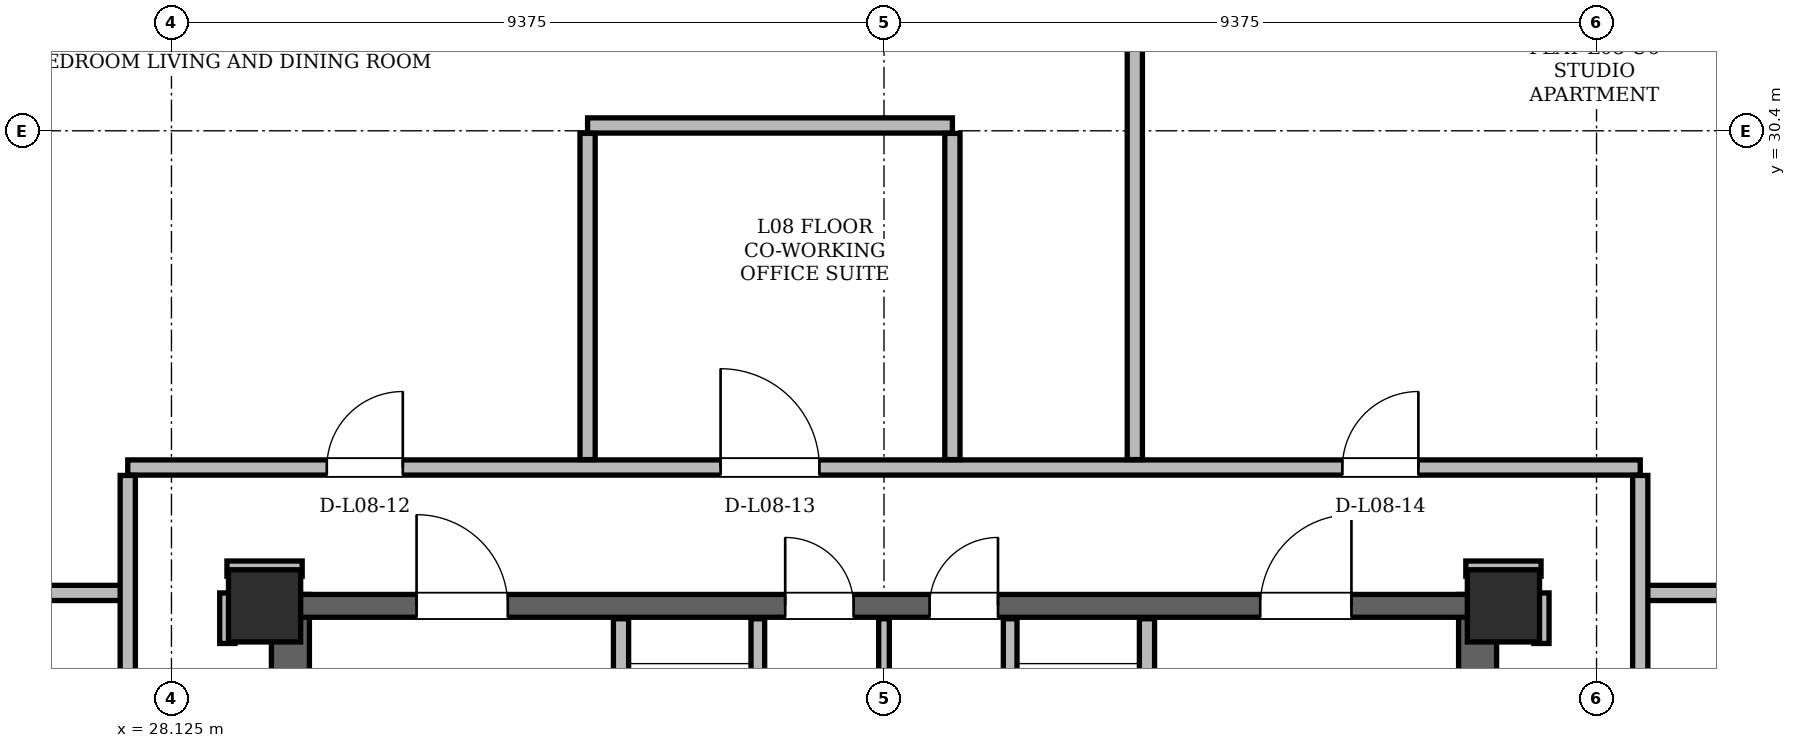
"""IFC4 building model, lengths in metres.
Left out: names, types, materials, properties, quantities, classifications, styles, units other than length and angle.
Written with IfcOpenShell. Run it as: python <this file> out.ifc"""

import sys

from ifc_helpers import new_model, si_unit, direction, frame, frame_2d, origin, origin_2d, place, context, subcontext, project, spatial, rectangle, hollow_rectangle, extrude, element, fill, save


model = new_model("IFC4")
c1 = context("Model", 3, precision=1e-05, world=origin(), true_north=direction((0.0, 1.0)))
c2 = subcontext(c1, "Body", "Model", "MODEL_VIEW")
j1 = project(units=[si_unit("LENGTHUNIT", "METRE"), si_unit("PLANEANGLEUNIT", "RADIAN")], contexts=[c1])
p1 = place(None, origin())
s1 = spatial("IfcSite", under=j1, at=p1, CompositionType="ELEMENT")
p2 = place(p1, origin())
s2 = spatial("IfcBuilding", under=s1, at=p2, CompositionType="ELEMENT")
p3 = place(p2, frame((0.0, 0.0, 34.5)))
s3 = spatial("IfcBuildingStorey", under=s2, at=p3, CompositionType="ELEMENT", Elevation=34.5)
for number, where, z_axis, x_axis in (
    (1, (45.65, 24.15, 0.0), (0.0, 0.0, 1.0), (1.0, 0.0, 0.0)),
    (2, (29.35, 24.15, 0.0), (0.0, 0.0, 1.0), (1.0, 0.0, 0.0)),
):
    element("IfcColumn", number, at=place(p3, frame(where, z_axis=z_axis, x_axis=x_axis)), inside=s3, PredefinedType="COLUMN", context=c2, shape_type="SweptSolid", body=[
        extrude(hollow_rectangle(XDim=0.95, YDim=0.95, WallThickness=0.08, at=origin_2d()), origin(), (0.0, 0.0, 1.0), 3.6),
    ])
for number, where, z_axis, x_axis in (
    (3, (29.69, 11.0, 0.0), (0.0, 0.0, 1.0), (0.0, 1.0, 0.0)),
    (4, (45.31, 11.0, 0.0), (0.0, 0.0, 1.0), (0.0, 1.0, 0.0)),
):
    element("IfcWall", number, at=place(p3, frame(where, z_axis=z_axis, x_axis=x_axis)), inside=s3, PredefinedType="SHEAR", context=c2, shape_type="SweptSolid", body=[
        extrude(rectangle(XDim=13.3, YDim=0.5, at=frame_2d((6.65, 0.0))), origin(), (0.0, 0.0, 1.0), 3.36),
    ])
p4 = place(p3, frame((29.65, 24.15, 0.0), z_axis=(0.0, 0.0, 1.0), x_axis=(1.0, 0.0, 0.0)))
e5 = element("IfcWall", 5, at=p4, inside=s3, PredefinedType="SHEAR", context=c2, shape_type="SweptSolid", body=[
    extrude(rectangle(XDim=15.7, YDim=0.3, at=frame_2d((7.85, 0.0))), origin(), (0.0, 0.0, 1.0), 3.36),
])
p5 = place(p4, frame((1.7, 0.0, 0.0)))
e6 = element("IfcOpeningElement", 6, at=p5, cuts=e5, PredefinedType="OPENING", context=c2, shape_type="SweptSolid", body=[
    extrude(rectangle(XDim=1.2, YDim=2.2, at=frame_2d((0.6, 1.1))), frame((0.0, 0.15, 0.0), z_axis=(0.0, -1.0, 0.0), x_axis=(1.0, 0.0, 0.0)), (0.0, 0.0, 1.0), 0.3),
])
p6 = place(p4, frame((12.8, 0.0, 0.0)))
e7 = element("IfcOpeningElement", 7, at=p6, cuts=e5, PredefinedType="OPENING", context=c2, shape_type="SweptSolid", body=[
    extrude(rectangle(XDim=1.2, YDim=2.2, at=frame_2d((0.6, 1.1))), frame((0.0, 0.15, 0.0), z_axis=(0.0, -1.0, 0.0), x_axis=(1.0, 0.0, 0.0)), (0.0, 0.0, 1.0), 0.3),
])
p7 = place(p4, frame((6.55, 0.0, 0.0)))
e8 = element("IfcOpeningElement", 8, at=p7, cuts=e5, PredefinedType="OPENING", context=c2, shape_type="SweptSolid", body=[
    extrude(rectangle(XDim=0.9, YDim=2.05, at=frame_2d((0.45, 1.025))), frame((0.0, 0.15, 0.0), z_axis=(0.0, -1.0, 0.0), x_axis=(1.0, 0.0, 0.0)), (0.0, 0.0, 1.0), 0.3),
])
p8 = place(p4, frame((8.45, 0.0, 0.0)))
e9 = element("IfcOpeningElement", 9, at=p8, cuts=e5, PredefinedType="OPENING", context=c2, shape_type="SweptSolid", body=[
    extrude(rectangle(XDim=0.9, YDim=2.05, at=frame_2d((0.45, 1.025))), frame((0.0, 0.15, 0.0), z_axis=(0.0, -1.0, 0.0), x_axis=(1.0, 0.0, 0.0)), (0.0, 0.0, 1.0), 0.3),
])
p9 = place(p3, frame((61.778, 15.108, 0.0), z_axis=(0.0, 0.0, 1.0), x_axis=(-0.499999106891, 0.866025919421, 0.0)))
e10 = element("IfcWall", 10, at=p9, inside=s3, PredefinedType="SOLIDWALL", context=c2, shape_type="SweptSolid", body=[
    extrude(rectangle(XDim=32.924, YDim=0.34, at=frame_2d((16.462, 0.0))), origin(), (0.0, 0.0, 1.0), 2.494),
])
p10 = place(p9, frame((6.159, 0.0, 0.0)))
e11 = element("IfcOpeningElement", 11, at=p10, cuts=e10, PredefinedType="OPENING", context=c2, shape_type="SweptSolid", body=[
    extrude(rectangle(XDim=1.5, YDim=2.2, at=frame_2d((0.75, 1.1))), frame((0.0, 0.17, 0.0), z_axis=(0.0, -1.0, 0.0), x_axis=(1.0, 0.0, 0.0)), (0.0, 0.0, 1.0), 0.34),
])
p11 = place(p9, frame((25.069, 0.0, 0.0)))
e12 = element("IfcOpeningElement", 12, at=p11, cuts=e10, PredefinedType="OPENING", context=c2, shape_type="SweptSolid", body=[
    extrude(rectangle(XDim=1.5, YDim=2.2, at=frame_2d((0.75, 1.1))), frame((0.0, 0.17, 0.0), z_axis=(0.0, -1.0, 0.0), x_axis=(1.0, 0.0, 0.0)), (0.0, 0.0, 1.0), 0.34),
])
p12 = place(p9, frame((2.207, 0.0, 0.85)))
e13 = element("IfcOpeningElement", 13, at=p12, cuts=e10, PredefinedType="OPENING", context=c2, shape_type="SweptSolid", body=[
    extrude(rectangle(XDim=2.2, YDim=1.534, at=frame_2d((1.1, 0.767))), frame((0.0, 0.17, 0.0), z_axis=(0.0, -1.0, 0.0), x_axis=(1.0, 0.0, 0.0)), (0.0, 0.0, 1.0), 0.34),
])
p13 = place(p9, frame((12.558, 0.0, 0.85)))
e14 = element("IfcOpeningElement", 14, at=p13, cuts=e10, PredefinedType="OPENING", context=c2, shape_type="SweptSolid", body=[
    extrude(rectangle(XDim=2.0, YDim=1.534, at=frame_2d((1.0, 0.767))), frame((0.0, 0.17, 0.0), z_axis=(0.0, -1.0, 0.0), x_axis=(1.0, 0.0, 0.0)), (0.0, 0.0, 1.0), 0.34),
])
p14 = place(p9, frame((19.845, 0.0, 0.85)))
e15 = element("IfcOpeningElement", 15, at=p14, cuts=e10, PredefinedType="OPENING", context=c2, shape_type="SweptSolid", body=[
    extrude(rectangle(XDim=1.4, YDim=1.534, at=frame_2d((0.7, 0.767))), frame((0.0, 0.17, 0.0), z_axis=(0.0, -1.0, 0.0), x_axis=(1.0, 0.0, 0.0)), (0.0, 0.0, 1.0), 0.34),
])
p15 = place(p9, frame((30.606, 0.0, 0.85)))
e16 = element("IfcOpeningElement", 16, at=p15, cuts=e10, PredefinedType="OPENING", context=c2, shape_type="SweptSolid", body=[
    extrude(rectangle(XDim=1.2, YDim=1.48, at=frame_2d((0.6, 0.74))), frame((0.0, 0.17, 0.0), z_axis=(0.0, -1.0, 0.0), x_axis=(1.0, 0.0, 0.0)), (0.0, 0.0, 1.0), 0.34),
])
p16 = place(p3, frame((29.684, 43.621, 0.0), z_axis=(0.0, 0.0, 1.0), x_axis=(-0.499999106891, -0.866025919421, 0.0)))
e17 = element("IfcWall", 17, at=p16, inside=s3, PredefinedType="SOLIDWALL", context=c2, shape_type="SweptSolid", body=[
    extrude(rectangle(XDim=32.924, YDim=0.34, at=frame_2d((16.462, 0.0))), origin(), (0.0, 0.0, 1.0), 2.494),
])
p17 = place(p16, frame((6.159, 0.0, 0.0)))
e18 = element("IfcOpeningElement", 18, at=p17, cuts=e17, PredefinedType="OPENING", context=c2, shape_type="SweptSolid", body=[
    extrude(rectangle(XDim=1.5, YDim=2.2, at=frame_2d((0.75, 1.1))), frame((0.0, 0.17, 0.0), z_axis=(0.0, -1.0, 0.0), x_axis=(1.0, 0.0, 0.0)), (0.0, 0.0, 1.0), 0.34),
])
p18 = place(p16, frame((24.019, 0.0, 0.0)))
e19 = element("IfcOpeningElement", 19, at=p18, cuts=e17, PredefinedType="OPENING", context=c2, shape_type="SweptSolid", body=[
    extrude(rectangle(XDim=1.5, YDim=2.2, at=frame_2d((0.75, 1.1))), frame((0.0, 0.17, 0.0), z_axis=(0.0, -1.0, 0.0), x_axis=(1.0, 0.0, 0.0)), (0.0, 0.0, 1.0), 0.34),
])
p19 = place(p16, frame((29.245, 0.0, 0.85)))
e20 = element("IfcOpeningElement", 20, at=p19, cuts=e17, PredefinedType="OPENING", context=c2, shape_type="SweptSolid", body=[
    extrude(rectangle(XDim=2.4, YDim=1.534, at=frame_2d((1.2, 0.767))), frame((0.0, 0.17, 0.0), z_axis=(0.0, -1.0, 0.0), x_axis=(1.0, 0.0, 0.0)), (0.0, 0.0, 1.0), 0.34),
])
p20 = place(p16, frame((10.753, 0.0, 0.85)))
e21 = element("IfcOpeningElement", 21, at=p20, cuts=e17, PredefinedType="OPENING", context=c2, shape_type="SweptSolid", body=[
    extrude(rectangle(XDim=2.5, YDim=1.534, at=frame_2d((1.25, 0.767))), frame((0.0, 0.17, 0.0), z_axis=(0.0, -1.0, 0.0), x_axis=(1.0, 0.0, 0.0)), (0.0, 0.0, 1.0), 0.34),
])
p21 = place(p16, frame((17.723, 0.0, 0.85)))
e22 = element("IfcOpeningElement", 22, at=p21, cuts=e17, PredefinedType="OPENING", context=c2, shape_type="SweptSolid", body=[
    extrude(rectangle(XDim=2.4, YDim=1.534, at=frame_2d((1.2, 0.767))), frame((0.0, 0.17, 0.0), z_axis=(0.0, -1.0, 0.0), x_axis=(1.0, 0.0, 0.0)), (0.0, 0.0, 1.0), 0.34),
])
p22 = place(p16, frame((1.538, 0.0, 0.85)))
e23 = element("IfcOpeningElement", 23, at=p22, cuts=e17, PredefinedType="OPENING", context=c2, shape_type="SweptSolid", body=[
    extrude(rectangle(XDim=1.2, YDim=1.48, at=frame_2d((0.6, 0.74))), frame((0.0, 0.17, 0.0), z_axis=(0.0, -1.0, 0.0), x_axis=(1.0, 0.0, 0.0)), (0.0, 0.0, 1.0), 0.34),
])
p23 = place(p16, frame((0.69, 0.0, 0.85)))
e24 = element("IfcOpeningElement", 24, at=p23, cuts=e17, PredefinedType="OPENING", context=c2, shape_type="SweptSolid", body=[
    extrude(rectangle(XDim=0.7, YDim=1.2, at=frame_2d((0.35, 0.6))), frame((0.0, 0.17, 0.0), z_axis=(0.0, -1.0, 0.0), x_axis=(1.0, 0.0, 0.0)), (0.0, 0.0, 1.0), 0.34),
])
p24 = place(p3, frame((34.04, 19.48, 0.0), z_axis=(0.0, 0.0, 1.0), x_axis=(0.0, 1.0, 0.0)))
e25 = element("IfcWall", 25, at=p24, inside=s3, PredefinedType="PARTITIONING", context=c2, shape_type="SweptSolid", body=[
    extrude(rectangle(XDim=4.5, YDim=0.2, at=frame_2d((2.25, 0.0))), origin(), (0.0, 0.0, 1.0), 2.4),
])
p25 = place(p24, frame((2.12, 0.0, 0.0)))
e26 = element("IfcOpeningElement", 26, at=p25, cuts=e25, PredefinedType="OPENING", context=c2, shape_type="SweptSolid", body=[
    extrude(rectangle(XDim=1.1, YDim=2.2, at=frame_2d((0.55, 1.1))), frame((0.0, 0.1, 0.0), z_axis=(0.0, -1.0, 0.0), x_axis=(1.0, 0.0, 0.0)), (0.0, 0.0, 1.0), 0.2),
])
p26 = place(p3, frame((35.84, 20.96, 0.0), z_axis=(0.0, 0.0, 1.0), x_axis=(0.0, 1.0, 0.0)))
e27 = element("IfcWall", 27, at=p26, inside=s3, PredefinedType="PARTITIONING", context=c2, shape_type="SweptSolid", body=[
    extrude(rectangle(XDim=3.02, YDim=0.18, at=frame_2d((1.51, 0.0))), origin(), (0.0, 0.0, 1.0), 2.4),
])
p27 = place(p3, frame((40.96, 19.48, 0.0), z_axis=(0.0, 0.0, 1.0), x_axis=(0.0, 1.0, 0.0)))
e28 = element("IfcWall", 28, at=p27, inside=s3, PredefinedType="PARTITIONING", context=c2, shape_type="SweptSolid", body=[
    extrude(rectangle(XDim=4.5, YDim=0.2, at=frame_2d((2.25, 0.0))), origin(), (0.0, 0.0, 1.0), 2.4),
])
p28 = place(p27, frame((2.12, 0.0, 0.0)))
e29 = element("IfcOpeningElement", 29, at=p28, cuts=e28, PredefinedType="OPENING", context=c2, shape_type="SweptSolid", body=[
    extrude(rectangle(XDim=1.1, YDim=2.2, at=frame_2d((0.55, 1.1))), frame((0.0, 0.1, 0.0), z_axis=(0.0, -1.0, 0.0), x_axis=(1.0, 0.0, 0.0)), (0.0, 0.0, 1.0), 0.2),
])
p29 = place(p3, frame((39.16, 20.96, 0.0), z_axis=(0.0, 0.0, 1.0), x_axis=(0.0, 1.0, 0.0)))
e30 = element("IfcWall", 30, at=p29, inside=s3, PredefinedType="PARTITIONING", context=c2, shape_type="SweptSolid", body=[
    extrude(rectangle(XDim=3.02, YDim=0.18, at=frame_2d((1.51, 0.0))), origin(), (0.0, 0.0, 1.0), 2.4),
])
p30 = place(p3, frame((37.5, 21.06, 0.0), z_axis=(0.0, 0.0, 1.0), x_axis=(0.0, 1.0, 0.0)))
e31 = element("IfcWall", 31, at=p30, inside=s3, PredefinedType="PARTITIONING", context=c2, shape_type="SweptSolid", body=[
    extrude(rectangle(XDim=2.92, YDim=0.14, at=frame_2d((1.46, 0.0))), origin(), (0.0, 0.0, 1.0), 2.4),
])
for number, where, z_axis, x_axis in (
    (32, (18.741, 24.32, 0.0), (0.0, 0.0, 1.0), (1.0, 0.0, 0.0)),
    (33, (47.45, 24.32, 0.0), (0.0, 0.0, 1.0), (1.0, 0.0, 0.0)),
):
    element("IfcWall", number, at=place(p3, frame(where, z_axis=z_axis, x_axis=x_axis)), inside=s3, PredefinedType="PARTITIONING", context=c2, shape_type="SweptSolid", body=[
        extrude(rectangle(XDim=8.809, YDim=0.2, at=frame_2d((4.404, 0.0))), origin(), (0.0, 0.0, 1.0), 2.494),
    ])
for number, where, z_axis, x_axis in (
    (34, (28.855, 24.64, 0.0), (0.0, 0.0, 1.0), (1.0, 0.0, 0.0)),
    (35, (45.155, 24.64, 0.0), (0.0, 0.0, 1.0), (1.0, 0.0, 0.0)),
):
    element("IfcWall", number, at=place(p3, frame(where, z_axis=z_axis, x_axis=x_axis)), inside=s3, PredefinedType="PARTITIONING", context=c2, shape_type="SweptSolid", body=[
        extrude(rectangle(XDim=0.99, YDim=0.2, at=frame_2d((0.495, 0.0))), origin(), (0.0, 0.0, 1.0), 2.738),
    ])
p31 = place(p3, frame((27.55, 25.97, 0.0), z_axis=(0.0, 0.0, 1.0), x_axis=(1.0, 0.0, 0.0)))
e36 = element("IfcWall", 36, at=p31, inside=s3, PredefinedType="PARTITIONING", context=c2, shape_type="SweptSolid", body=[
    extrude(rectangle(XDim=19.9, YDim=0.2, at=frame_2d((9.95, 0.0))), origin(), (0.0, 0.0, 1.0), 2.738),
])
p32 = place(p31, frame((2.619, 0.0, 0.0)))
e37 = element("IfcOpeningElement", 37, at=p32, cuts=e36, PredefinedType="OPENING", context=c2, shape_type="SweptSolid", body=[
    extrude(rectangle(XDim=1.0, YDim=2.18, at=frame_2d((0.5, 1.09))), frame((0.0, 0.1, 0.0), z_axis=(0.0, -1.0, 0.0), x_axis=(1.0, 0.0, 0.0)), (0.0, 0.0, 1.0), 0.2),
])
p33 = place(p31, frame((7.8, 0.0, 0.0)))
e38 = element("IfcOpeningElement", 38, at=p33, cuts=e36, PredefinedType="OPENING", context=c2, shape_type="SweptSolid", body=[
    extrude(rectangle(XDim=1.3, YDim=2.2, at=frame_2d((0.65, 1.1))), frame((0.0, 0.1, 0.0), z_axis=(0.0, -1.0, 0.0), x_axis=(1.0, 0.0, 0.0)), (0.0, 0.0, 1.0), 0.2),
])
p34 = place(p31, frame((15.981, 0.0, 0.0)))
e39 = element("IfcOpeningElement", 39, at=p34, cuts=e36, PredefinedType="OPENING", context=c2, shape_type="SweptSolid", body=[
    extrude(rectangle(XDim=1.0, YDim=2.18, at=frame_2d((0.5, 1.09))), frame((0.0, 0.1, 0.0), z_axis=(0.0, -1.0, 0.0), x_axis=(1.0, 0.0, 0.0)), (0.0, 0.0, 1.0), 0.2),
])
p35 = place(p3, frame((33.6, 30.47, 0.0), z_axis=(0.0, 0.0, 1.0), x_axis=(1.0, 0.0, 0.0)))
e40 = element("IfcWall", 40, at=p35, inside=s3, PredefinedType="PARTITIONING", context=c2, shape_type="SweptSolid", body=[
    extrude(rectangle(XDim=4.8, YDim=0.2, at=frame_2d((2.4, 0.0))), origin(), (0.0, 0.0, 1.0), 3.36),
])
p36 = place(p3, frame((27.55, 11.054, 0.0), z_axis=(0.0, 0.0, 1.0), x_axis=(0.0, 1.0, 0.0)))
e41 = element("IfcWall", 41, at=p36, inside=s3, PredefinedType="PARTITIONING", context=c2, shape_type="SweptSolid", body=[
    extrude(rectangle(XDim=14.812, YDim=0.2, at=frame_2d((7.406, 0.0))), origin(), (0.0, 0.0, 1.0), 2.738),
])
p37 = place(p36, frame((7.932, 0.0, 0.0)))
e42 = element("IfcOpeningElement", 42, at=p37, cuts=e41, PredefinedType="OPENING", context=c2, shape_type="SweptSolid", body=[
    extrude(rectangle(XDim=1.0, YDim=2.18, at=frame_2d((0.5, 1.09))), frame((0.0, 0.1, 0.0), z_axis=(0.0, -1.0, 0.0), x_axis=(1.0, 0.0, 0.0)), (0.0, 0.0, 1.0), 0.2),
])
p38 = place(p3, frame((28.86, 23.655, 0.0), z_axis=(0.0, 0.0, 1.0), x_axis=(0.0, 1.0, 0.0)))
e43 = element("IfcWall", 43, at=p38, inside=s3, PredefinedType="PARTITIONING", context=c2, shape_type="SweptSolid", body=[
    extrude(rectangle(XDim=0.665, YDim=0.2, at=frame_2d((0.333, 0.0))), origin(), (0.0, 0.0, 1.0), 3.36),
])
for number, where, z_axis, x_axis in (
    (44, (33.6, 26.074, 0.0), (0.0, 0.0, 1.0), (0.0, 1.0, 0.0)),
    (45, (38.4, 26.074, 0.0), (0.0, 0.0, 1.0), (0.0, 1.0, 0.0)),
):
    element("IfcWall", number, at=place(p3, frame(where, z_axis=z_axis, x_axis=x_axis)), inside=s3, PredefinedType="PARTITIONING", context=c2, shape_type="SweptSolid", body=[
        extrude(rectangle(XDim=4.292, YDim=0.2, at=frame_2d((2.146, 0.0))), origin(), (0.0, 0.0, 1.0), 3.36),
    ])
p39 = place(p3, frame((40.8, 26.074, 0.0), z_axis=(0.0, 0.0, 1.0), x_axis=(0.0, 1.0, 0.0)))
e46 = element("IfcWall", 46, at=p39, inside=s3, PredefinedType="PARTITIONING", context=c2, shape_type="SweptSolid", body=[
    extrude(rectangle(XDim=17.373, YDim=0.2, at=frame_2d((8.687, 0.0))), origin(), (0.0, 0.0, 1.0), 3.36),
])
p40 = place(p3, frame((46.15, 23.655, 0.0), z_axis=(0.0, 0.0, 1.0), x_axis=(0.0, 1.0, 0.0)))
e47 = element("IfcWall", 47, at=p40, inside=s3, PredefinedType="PARTITIONING", context=c2, shape_type="SweptSolid", body=[
    extrude(rectangle(XDim=0.665, YDim=0.2, at=frame_2d((0.333, 0.0))), origin(), (0.0, 0.0, 1.0), 3.36),
])
p41 = place(p3, frame((47.45, 11.054, 0.0), z_axis=(0.0, 0.0, 1.0), x_axis=(0.0, 1.0, 0.0)))
e48 = element("IfcWall", 48, at=p41, inside=s3, PredefinedType="PARTITIONING", context=c2, shape_type="SweptSolid", body=[
    extrude(rectangle(XDim=14.812, YDim=0.2, at=frame_2d((7.406, 0.0))), origin(), (0.0, 0.0, 1.0), 2.738),
])
p42 = place(p41, frame((7.932, 0.0, 0.0)))
e49 = element("IfcOpeningElement", 49, at=p42, cuts=e48, PredefinedType="OPENING", context=c2, shape_type="SweptSolid", body=[
    extrude(rectangle(XDim=1.0, YDim=2.18, at=frame_2d((0.5, 1.09))), frame((0.0, 0.1, 0.0), z_axis=(0.0, -1.0, 0.0), x_axis=(1.0, 0.0, 0.0)), (0.0, 0.0, 1.0), 0.2),
])
p43 = place(p5, origin())
e50 = element("IfcDoor", 50, at=p43, inside=s3, OperationType="SINGLE_SWING_LEFT", PredefinedType="DOOR", context=c2, shape_type="SweptSolid", body=[
    extrude(rectangle(XDim=1.2, YDim=2.2, at=frame_2d((0.6, 1.1))), frame((0.0, 0.025, 0.0), z_axis=(0.0, -1.0, 0.0), x_axis=(1.0, 0.0, 0.0)), (0.0, 0.0, 1.0), 0.05),
])
fill(e6, e50)
p44 = place(p6, origin())
e51 = element("IfcDoor", 51, at=p44, inside=s3, OperationType="SINGLE_SWING_RIGHT", PredefinedType="DOOR", context=c2, shape_type="SweptSolid", body=[
    extrude(rectangle(XDim=1.2, YDim=2.2, at=frame_2d((0.6, 1.1))), frame((0.0, 0.025, 0.0), z_axis=(0.0, -1.0, 0.0), x_axis=(1.0, 0.0, 0.0)), (0.0, 0.0, 1.0), 0.05),
])
fill(e7, e51)
p45 = place(p7, origin())
e52 = element("IfcDoor", 52, at=p45, inside=s3, OperationType="SINGLE_SWING_LEFT", PredefinedType="DOOR", context=c2, shape_type="SweptSolid", body=[
    extrude(rectangle(XDim=0.9, YDim=2.05, at=frame_2d((0.45, 1.025))), frame((0.0, 0.025, 0.0), z_axis=(0.0, -1.0, 0.0), x_axis=(1.0, 0.0, 0.0)), (0.0, 0.0, 1.0), 0.05),
])
fill(e8, e52)
p46 = place(p8, origin())
e53 = element("IfcDoor", 53, at=p46, inside=s3, OperationType="SINGLE_SWING_RIGHT", PredefinedType="DOOR", context=c2, shape_type="SweptSolid", body=[
    extrude(rectangle(XDim=0.9, YDim=2.05, at=frame_2d((0.45, 1.025))), frame((0.0, 0.025, 0.0), z_axis=(0.0, -1.0, 0.0), x_axis=(1.0, 0.0, 0.0)), (0.0, 0.0, 1.0), 0.05),
])
fill(e9, e53)
p47 = place(p32, origin())
e54 = element("IfcDoor", 54, at=p47, inside=s3, OperationType="SINGLE_SWING_RIGHT", PredefinedType="DOOR", context=c2, shape_type="SweptSolid", body=[
    extrude(rectangle(XDim=1.0, YDim=2.18, at=frame_2d((0.5, 1.09))), frame((0.0, 0.025, 0.0), z_axis=(0.0, -1.0, 0.0), x_axis=(1.0, 0.0, 0.0)), (0.0, 0.0, 1.0), 0.05),
])
fill(e37, e54)
p48 = place(p33, origin())
e55 = element("IfcDoor", 55, at=p48, inside=s3, OperationType="SINGLE_SWING_LEFT", PredefinedType="DOOR", context=c2, shape_type="SweptSolid", body=[
    extrude(rectangle(XDim=1.3, YDim=2.2, at=frame_2d((0.65, 1.1))), frame((0.0, 0.025, 0.0), z_axis=(0.0, -1.0, 0.0), x_axis=(1.0, 0.0, 0.0)), (0.0, 0.0, 1.0), 0.05),
])
fill(e38, e55)
p49 = place(p34, origin())
e56 = element("IfcDoor", 56, at=p49, inside=s3, OperationType="SINGLE_SWING_RIGHT", PredefinedType="DOOR", context=c2, shape_type="SweptSolid", body=[
    extrude(rectangle(XDim=1.0, YDim=2.18, at=frame_2d((0.5, 1.09))), frame((0.0, 0.025, 0.0), z_axis=(0.0, -1.0, 0.0), x_axis=(1.0, 0.0, 0.0)), (0.0, 0.0, 1.0), 0.05),
])
fill(e39, e56)
save(model, sys.argv[1])
